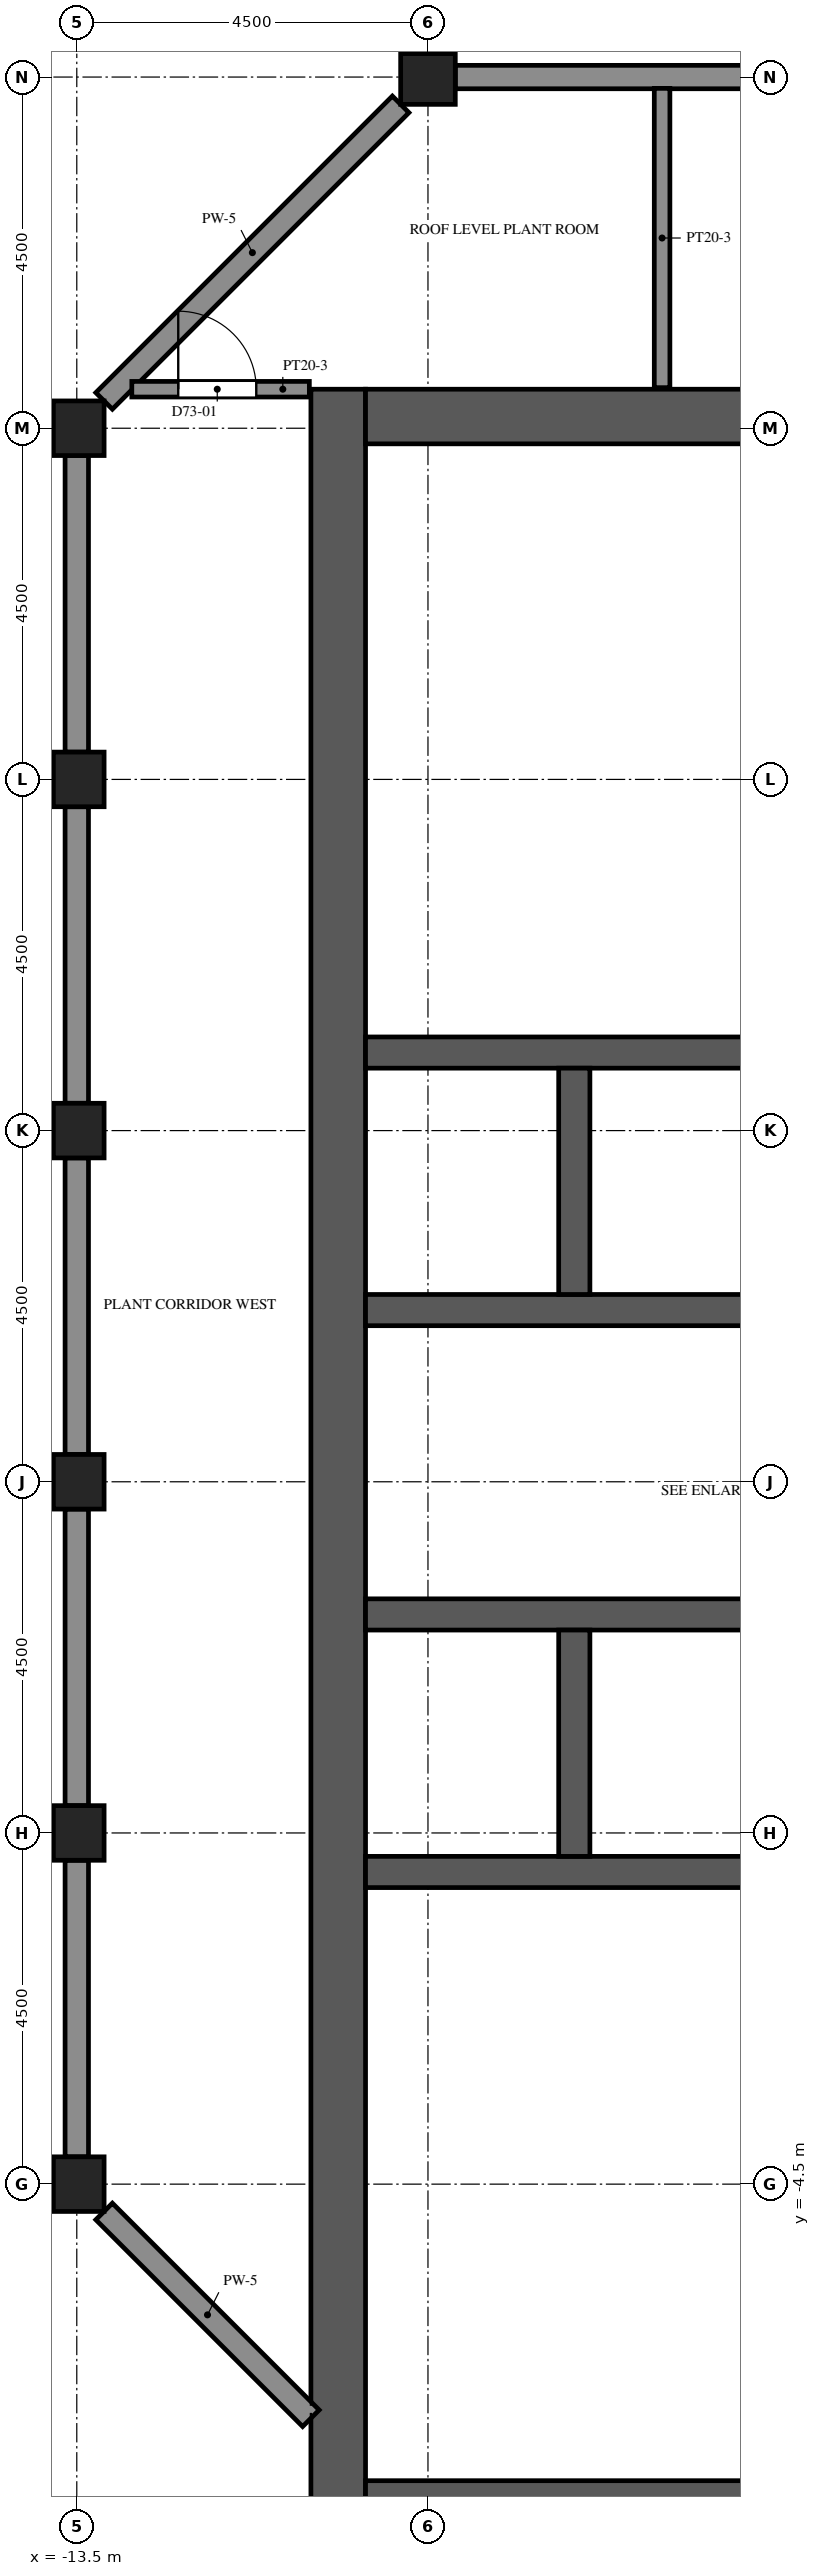
"""IFC4 building model, lengths in metres.
Left out: names, types, materials, properties, quantities, classifications, styles, units other than length and angle.
Written with IfcOpenShell. Run it as: python <this file> out.ifc"""

import sys

from ifc_helpers import new_model, si_unit, direction, frame, frame_2d, origin, origin_2d, place, context, subcontext, project, spatial, rectangle, extrude, element, fill, save


model = new_model("IFC4")
c1 = context("Model", 3, precision=1e-05, world=origin(), true_north=direction((0.0, 1.0)))
c2 = subcontext(c1, "Body", "Model", "MODEL_VIEW")
j1 = project(units=[si_unit("LENGTHUNIT", "METRE"), si_unit("PLANEANGLEUNIT", "RADIAN")], contexts=[c1])
p1 = place(None, origin())
s1 = spatial("IfcSite", under=j1, at=p1, CompositionType="ELEMENT")
p2 = place(p1, origin())
s2 = spatial("IfcBuilding", under=s1, at=p2, CompositionType="ELEMENT")
p3 = place(p2, frame((0.0, 0.0, 326.2)))
s3 = spatial("IfcBuildingStorey", under=s2, at=p3, CompositionType="ELEMENT", Elevation=326.2)
for number, where, z_axis, x_axis in (
    (1, (-13.5, -4.5, 0.0), (0.0, 0.0, 1.0), (1.0, 0.0, 0.0)),
    (2, (-13.5, 0.0, 0.0), (0.0, 0.0, 1.0), (1.0, 0.0, 0.0)),
    (3, (-13.5, 4.5, 0.0), (0.0, 0.0, 1.0), (1.0, 0.0, 0.0)),
    (4, (-13.5, 9.0, 0.0), (0.0, 0.0, 1.0), (1.0, 0.0, 0.0)),
    (5, (-13.5, 13.5, 0.0), (0.0, 0.0, 1.0), (1.0, 0.0, 0.0)),
    (6, (-13.5, 18.0, 0.0), (0.0, 0.0, 1.0), (1.0, 0.0, 0.0)),
    (7, (-9.0, 22.5, 0.0), (0.0, 0.0, 1.0), (1.0, 0.0, 0.0)),
):
    element("IfcColumn", number, at=place(p3, frame(where, z_axis=z_axis, x_axis=x_axis)), inside=s3, PredefinedType="COLUMN", context=c2, shape_type="SweptSolid", body=[
        extrude(rectangle(XDim=0.7, YDim=0.7, at=origin_2d()), origin(), (0.0, 0.0, 1.0), 3.6),
    ])
p4 = place(p3, frame((-10.15, -9.0, 0.0), z_axis=(0.0, 0.0, 1.0), x_axis=(0.0, 1.0, 0.0)))
e8 = element("IfcWall", 8, at=p4, inside=s3, PredefinedType="SHEAR", context=c2, shape_type="SweptSolid", body=[
    extrude(rectangle(XDim=27.5, YDim=0.7, at=frame_2d((13.75, 0.0))), origin(), (0.0, 0.0, 1.0), 3.2),
])
p5 = place(p4, frame((12.55, 0.0, 0.0)))
e9 = element("IfcOpeningElement", 9, at=p5, cuts=e8, PredefinedType="OPENING", context=c2, shape_type="SweptSolid", body=[
    extrude(rectangle(XDim=2.4, YDim=2.4, at=frame_2d((1.2, 1.2))), frame((0.0, 0.36, 0.0), z_axis=(0.0, -1.0, 0.0), x_axis=(1.0, 0.0, 0.0)), (0.0, 0.0, 1.0), 0.72),
])
p6 = place(p4, frame((6.825, 0.0, 0.0)))
e10 = element("IfcOpeningElement", 10, at=p6, cuts=e8, PredefinedType="OPENING", context=c2, shape_type="SweptSolid", body=[
    extrude(rectangle(XDim=1.2, YDim=2.1, at=frame_2d((0.6, 1.05))), frame((0.0, 0.36, 0.0), z_axis=(0.0, -1.0, 0.0), x_axis=(1.0, 0.0, 0.0)), (0.0, 0.0, 1.0), 0.72),
])
p7 = place(p4, frame((19.475, 0.0, 0.0)))
e11 = element("IfcOpeningElement", 11, at=p7, cuts=e8, PredefinedType="OPENING", context=c2, shape_type="SweptSolid", body=[
    extrude(rectangle(XDim=1.2, YDim=2.1, at=frame_2d((0.6, 1.05))), frame((0.0, 0.36, 0.0), z_axis=(0.0, -1.0, 0.0), x_axis=(1.0, 0.0, 0.0)), (0.0, 0.0, 1.0), 0.72),
])
for number, where, z_axis, x_axis in (
    (12, (-9.8, -8.65, 0.0), (0.0, 0.0, 1.0), (1.0, 0.0, 0.0)),
    (13, (-9.8, 18.15, 0.0), (0.0, 0.0, 1.0), (1.0, 0.0, 0.0)),
):
    element("IfcWall", number, at=place(p3, frame(where, z_axis=z_axis, x_axis=x_axis)), inside=s3, PredefinedType="SHEAR", context=c2, shape_type="SweptSolid", body=[
        extrude(rectangle(XDim=10.6, YDim=0.7, at=frame_2d((5.3, 0.0))), origin(), (0.0, 0.0, 1.0), 3.2),
    ])
p8 = place(p3, frame((-9.8, -0.5, 0.0), z_axis=(0.0, 0.0, 1.0), x_axis=(1.0, 0.0, 0.0)))
e14 = element("IfcWall", 14, at=p8, inside=s3, PredefinedType="SHEAR", context=c2, shape_type="SweptSolid", body=[
    extrude(rectangle(XDim=10.6, YDim=0.4, at=frame_2d((5.3, 0.0))), origin(), (0.0, 0.0, 1.0), 3.2),
])
p9 = place(p3, frame((-9.8, 2.8, 0.0), z_axis=(0.0, 0.0, 1.0), x_axis=(1.0, 0.0, 0.0)))
e15 = element("IfcWall", 15, at=p9, inside=s3, PredefinedType="SHEAR", context=c2, shape_type="SweptSolid", body=[
    extrude(rectangle(XDim=10.6, YDim=0.4, at=frame_2d((5.3, 0.0))), origin(), (0.0, 0.0, 1.0), 3.2),
])
p10 = place(p9, frame((0.688, 0.0, 0.0)))
e16 = element("IfcOpeningElement", 16, at=p10, cuts=e15, PredefinedType="OPENING", context=c2, shape_type="SweptSolid", body=[
    extrude(rectangle(XDim=1.1, YDim=2.1, at=frame_2d((0.55, 1.05))), frame((0.0, 0.21, 0.0), z_axis=(0.0, -1.0, 0.0), x_axis=(1.0, 0.0, 0.0)), (0.0, 0.0, 1.0), 0.42),
])
p11 = place(p9, frame((3.488, 0.0, 0.0)))
e17 = element("IfcOpeningElement", 17, at=p11, cuts=e15, PredefinedType="OPENING", context=c2, shape_type="SweptSolid", body=[
    extrude(rectangle(XDim=1.0, YDim=2.1, at=frame_2d((0.5, 1.05))), frame((0.0, 0.21, 0.0), z_axis=(0.0, -1.0, 0.0), x_axis=(1.0, 0.0, 0.0)), (0.0, 0.0, 1.0), 0.42),
])
p12 = place(p9, frame((6.113, 0.0, 0.0)))
e18 = element("IfcOpeningElement", 18, at=p12, cuts=e15, PredefinedType="OPENING", context=c2, shape_type="SweptSolid", body=[
    extrude(rectangle(XDim=1.0, YDim=2.1, at=frame_2d((0.5, 1.05))), frame((0.0, 0.21, 0.0), z_axis=(0.0, -1.0, 0.0), x_axis=(1.0, 0.0, 0.0)), (0.0, 0.0, 1.0), 0.42),
])
p13 = place(p9, frame((8.863, 0.0, 0.0)))
e19 = element("IfcOpeningElement", 19, at=p13, cuts=e15, PredefinedType="OPENING", context=c2, shape_type="SweptSolid", body=[
    extrude(rectangle(XDim=1.0, YDim=2.1, at=frame_2d((0.5, 1.05))), frame((0.0, 0.21, 0.0), z_axis=(0.0, -1.0, 0.0), x_axis=(1.0, 0.0, 0.0)), (0.0, 0.0, 1.0), 0.42),
])
p14 = place(p3, frame((-9.8, 6.7, 0.0), z_axis=(0.0, 0.0, 1.0), x_axis=(1.0, 0.0, 0.0)))
e20 = element("IfcWall", 20, at=p14, inside=s3, PredefinedType="SHEAR", context=c2, shape_type="SweptSolid", body=[
    extrude(rectangle(XDim=10.6, YDim=0.4, at=frame_2d((5.3, 0.0))), origin(), (0.0, 0.0, 1.0), 3.2),
])
p15 = place(p14, frame((0.738, 0.0, 0.0)))
e21 = element("IfcOpeningElement", 21, at=p15, cuts=e20, PredefinedType="OPENING", context=c2, shape_type="SweptSolid", body=[
    extrude(rectangle(XDim=1.0, YDim=2.1, at=frame_2d((0.5, 1.05))), frame((0.0, 0.21, 0.0), z_axis=(0.0, -1.0, 0.0), x_axis=(1.0, 0.0, 0.0)), (0.0, 0.0, 1.0), 0.42),
])
p16 = place(p14, frame((3.488, 0.0, 0.0)))
e22 = element("IfcOpeningElement", 22, at=p16, cuts=e20, PredefinedType="OPENING", context=c2, shape_type="SweptSolid", body=[
    extrude(rectangle(XDim=1.0, YDim=2.1, at=frame_2d((0.5, 1.05))), frame((0.0, 0.21, 0.0), z_axis=(0.0, -1.0, 0.0), x_axis=(1.0, 0.0, 0.0)), (0.0, 0.0, 1.0), 0.42),
])
p17 = place(p14, frame((6.113, 0.0, 0.0)))
e23 = element("IfcOpeningElement", 23, at=p17, cuts=e20, PredefinedType="OPENING", context=c2, shape_type="SweptSolid", body=[
    extrude(rectangle(XDim=1.0, YDim=2.1, at=frame_2d((0.5, 1.05))), frame((0.0, 0.21, 0.0), z_axis=(0.0, -1.0, 0.0), x_axis=(1.0, 0.0, 0.0)), (0.0, 0.0, 1.0), 0.42),
])
p18 = place(p14, frame((8.863, 0.0, 0.0)))
e24 = element("IfcOpeningElement", 24, at=p18, cuts=e20, PredefinedType="OPENING", context=c2, shape_type="SweptSolid", body=[
    extrude(rectangle(XDim=1.0, YDim=2.1, at=frame_2d((0.5, 1.05))), frame((0.0, 0.21, 0.0), z_axis=(0.0, -1.0, 0.0), x_axis=(1.0, 0.0, 0.0)), (0.0, 0.0, 1.0), 0.42),
])
p19 = place(p3, frame((-9.8, 10.0, 0.0), z_axis=(0.0, 0.0, 1.0), x_axis=(1.0, 0.0, 0.0)))
e25 = element("IfcWall", 25, at=p19, inside=s3, PredefinedType="SHEAR", context=c2, shape_type="SweptSolid", body=[
    extrude(rectangle(XDim=10.6, YDim=0.4, at=frame_2d((5.3, 0.0))), origin(), (0.0, 0.0, 1.0), 3.2),
])
for number, where, z_axis, x_axis in (
    (26, (-7.125, -0.3, 0.0), (0.0, 0.0, 1.0), (0.0, 1.0, 0.0)),
    (27, (-7.125, 6.9, 0.0), (0.0, 0.0, 1.0), (0.0, 1.0, 0.0)),
):
    element("IfcWall", number, at=place(p3, frame(where, z_axis=z_axis, x_axis=x_axis)), inside=s3, PredefinedType="SHEAR", context=c2, shape_type="SweptSolid", body=[
        extrude(rectangle(XDim=2.9, YDim=0.4, at=frame_2d((1.45, 0.0))), origin(), (0.0, 0.0, 1.0), 3.2),
    ])
p20 = place(p3, frame((-4.85, 22.5, 0.0), z_axis=(0.0, 0.0, 1.0), x_axis=(-1.0, 0.0, 0.0)))
e28 = element("IfcWall", 28, at=p20, inside=s3, PredefinedType="SOLIDWALL", context=c2, shape_type="SweptSolid", body=[
    extrude(rectangle(XDim=3.8, YDim=0.3, at=frame_2d((1.9, 0.0))), origin(), (0.0, 0.0, 1.0), 0.85),
])
p21 = place(p3, frame((-9.35, 22.15, 0.0), z_axis=(0.0, 0.0, 1.0), x_axis=(-0.707106781187, -0.707106781187, 0.0)))
e29 = element("IfcWall", 29, at=p21, inside=s3, PredefinedType="SOLIDWALL", context=c2, shape_type="SweptSolid", body=[
    extrude(rectangle(XDim=5.374, YDim=0.3, at=frame_2d((2.687, 0.0))), origin(), (0.0, 0.0, 1.0), 2.5),
])
for number, where, z_axis, x_axis in (
    (30, (-13.5, 17.65, 0.0), (0.0, 0.0, 1.0), (0.0, -1.0, 0.0)),
    (31, (-13.5, 13.15, 0.0), (0.0, 0.0, 1.0), (0.0, -1.0, 0.0)),
    (32, (-13.5, 8.65, 0.0), (0.0, 0.0, 1.0), (0.0, -1.0, 0.0)),
    (33, (-13.5, 4.15, 0.0), (0.0, 0.0, 1.0), (0.0, -1.0, 0.0)),
    (34, (-13.5, -0.35, 0.0), (0.0, 0.0, 1.0), (0.0, -1.0, 0.0)),
):
    element("IfcWall", number, at=place(p3, frame(where, z_axis=z_axis, x_axis=x_axis)), inside=s3, PredefinedType="SOLIDWALL", context=c2, shape_type="SweptSolid", body=[
        extrude(rectangle(XDim=3.8, YDim=0.3, at=frame_2d((1.9, 0.0))), origin(), (0.0, 0.0, 1.0), 0.85),
    ])
p22 = place(p3, frame((-13.15, -4.85, 0.0), z_axis=(0.0, 0.0, 1.0), x_axis=(0.707106781187, -0.707106781187, 0.0)))
e35 = element("IfcWall", 35, at=p22, inside=s3, PredefinedType="SOLIDWALL", context=c2, shape_type="SweptSolid", body=[
    extrude(rectangle(XDim=3.748, YDim=0.3, at=frame_2d((1.874, 0.0))), origin(), (0.0, 0.0, 1.0), 2.5),
])
p23 = place(p3, frame((-12.795, 18.5, 0.0), z_axis=(0.0, 0.0, 1.0), x_axis=(1.0, 0.0, 0.0)))
e36 = element("IfcWall", 36, at=p23, inside=s3, PredefinedType="PARTITIONING", context=c2, shape_type="SweptSolid", body=[
    extrude(rectangle(XDim=2.275, YDim=0.2, at=frame_2d((1.137, 0.0))), origin(), (0.0, 0.0, 1.0), 3.2),
])
p24 = place(p23, frame((0.595, 0.0, 0.0)))
e37 = element("IfcOpeningElement", 37, at=p24, cuts=e36, PredefinedType="OPENING", context=c2, shape_type="SweptSolid", body=[
    extrude(rectangle(XDim=1.0, YDim=2.1, at=frame_2d((0.5, 1.05))), frame((0.0, 0.11, 0.0), z_axis=(0.0, -1.0, 0.0), x_axis=(1.0, 0.0, 0.0)), (0.0, 0.0, 1.0), 0.22),
])
p25 = place(p3, frame((-6.0, 22.355, 0.0), z_axis=(0.0, 0.0, 1.0), x_axis=(0.0, -1.0, 0.0)))
e38 = element("IfcWall", 38, at=p25, inside=s3, PredefinedType="PARTITIONING", context=c2, shape_type="SweptSolid", body=[
    extrude(rectangle(XDim=3.835, YDim=0.2, at=frame_2d((1.917, 0.0))), origin(), (0.0, 0.0, 1.0), 3.2),
])
p26 = place(p24, origin())
e39 = element("IfcDoor", 39, at=p26, inside=s3, OperationType="SINGLE_SWING_LEFT", PredefinedType="DOOR", context=c2, shape_type="SweptSolid", body=[
    extrude(rectangle(XDim=1.0, YDim=2.1, at=frame_2d((0.5, 1.05))), frame((0.0, 0.025, 0.0), z_axis=(0.0, -1.0, 0.0), x_axis=(1.0, 0.0, 0.0)), (0.0, 0.0, 1.0), 0.05),
])
fill(e37, e39)
p27 = place(p10, origin())
e40 = element("IfcDoor", 40, at=p27, inside=s3, OperationType="DOUBLE_DOOR_SLIDING", PredefinedType="DOOR", context=c2, shape_type="SweptSolid", body=[
    extrude(rectangle(XDim=1.1, YDim=2.1, at=frame_2d((0.55, 1.05))), frame((0.0, 0.025, 0.0), z_axis=(0.0, -1.0, 0.0), x_axis=(1.0, 0.0, 0.0)), (0.0, 0.0, 1.0), 0.05),
])
fill(e16, e40)
p28 = place(p5, origin())
e41 = element("IfcDoor", 41, at=p28, inside=s3, OperationType="DOUBLE_DOOR_DOUBLE_SWING", PredefinedType="DOOR", context=c2, shape_type="SweptSolid", body=[
    extrude(rectangle(XDim=2.4, YDim=2.4, at=frame_2d((1.2, 1.2))), frame((0.0, 0.025, 0.0), z_axis=(0.0, -1.0, 0.0), x_axis=(1.0, 0.0, 0.0)), (0.0, 0.0, 1.0), 0.05),
])
fill(e9, e41)
p29 = place(p6, origin())
e42 = element("IfcDoor", 42, at=p29, inside=s3, OperationType="SINGLE_SWING_LEFT", PredefinedType="DOOR", context=c2, shape_type="SweptSolid", body=[
    extrude(rectangle(XDim=1.2, YDim=2.1, at=frame_2d((0.6, 1.05))), frame((0.0, 0.025, 0.0), z_axis=(0.0, -1.0, 0.0), x_axis=(1.0, 0.0, 0.0)), (0.0, 0.0, 1.0), 0.05),
])
fill(e10, e42)
p30 = place(p7, origin())
e43 = element("IfcDoor", 43, at=p30, inside=s3, OperationType="SINGLE_SWING_LEFT", PredefinedType="DOOR", context=c2, shape_type="SweptSolid", body=[
    extrude(rectangle(XDim=1.2, YDim=2.1, at=frame_2d((0.6, 1.05))), frame((0.0, 0.025, 0.0), z_axis=(0.0, -1.0, 0.0), x_axis=(1.0, 0.0, 0.0)), (0.0, 0.0, 1.0), 0.05),
])
fill(e11, e43)
p31 = place(p11, origin())
e44 = element("IfcDoor", 44, at=p31, inside=s3, OperationType="SINGLE_SWING_RIGHT", PredefinedType="DOOR", context=c2, shape_type="SweptSolid", body=[
    extrude(rectangle(XDim=1.0, YDim=2.1, at=frame_2d((0.5, 1.05))), frame((0.0, 0.025, 0.0), z_axis=(0.0, -1.0, 0.0), x_axis=(1.0, 0.0, 0.0)), (0.0, 0.0, 1.0), 0.05),
])
fill(e17, e44)
p32 = place(p15, origin())
e45 = element("IfcDoor", 45, at=p32, inside=s3, OperationType="SINGLE_SWING_LEFT", PredefinedType="DOOR", context=c2, shape_type="SweptSolid", body=[
    extrude(rectangle(XDim=1.0, YDim=2.1, at=frame_2d((0.5, 1.05))), frame((0.0, 0.025, 0.0), z_axis=(0.0, -1.0, 0.0), x_axis=(1.0, 0.0, 0.0)), (0.0, 0.0, 1.0), 0.05),
])
fill(e21, e45)
p33 = place(p16, origin())
e46 = element("IfcDoor", 46, at=p33, inside=s3, OperationType="SINGLE_SWING_RIGHT", PredefinedType="DOOR", context=c2, shape_type="SweptSolid", body=[
    extrude(rectangle(XDim=1.0, YDim=2.1, at=frame_2d((0.5, 1.05))), frame((0.0, 0.025, 0.0), z_axis=(0.0, -1.0, 0.0), x_axis=(1.0, 0.0, 0.0)), (0.0, 0.0, 1.0), 0.05),
])
fill(e22, e46)
save(model, sys.argv[1])
